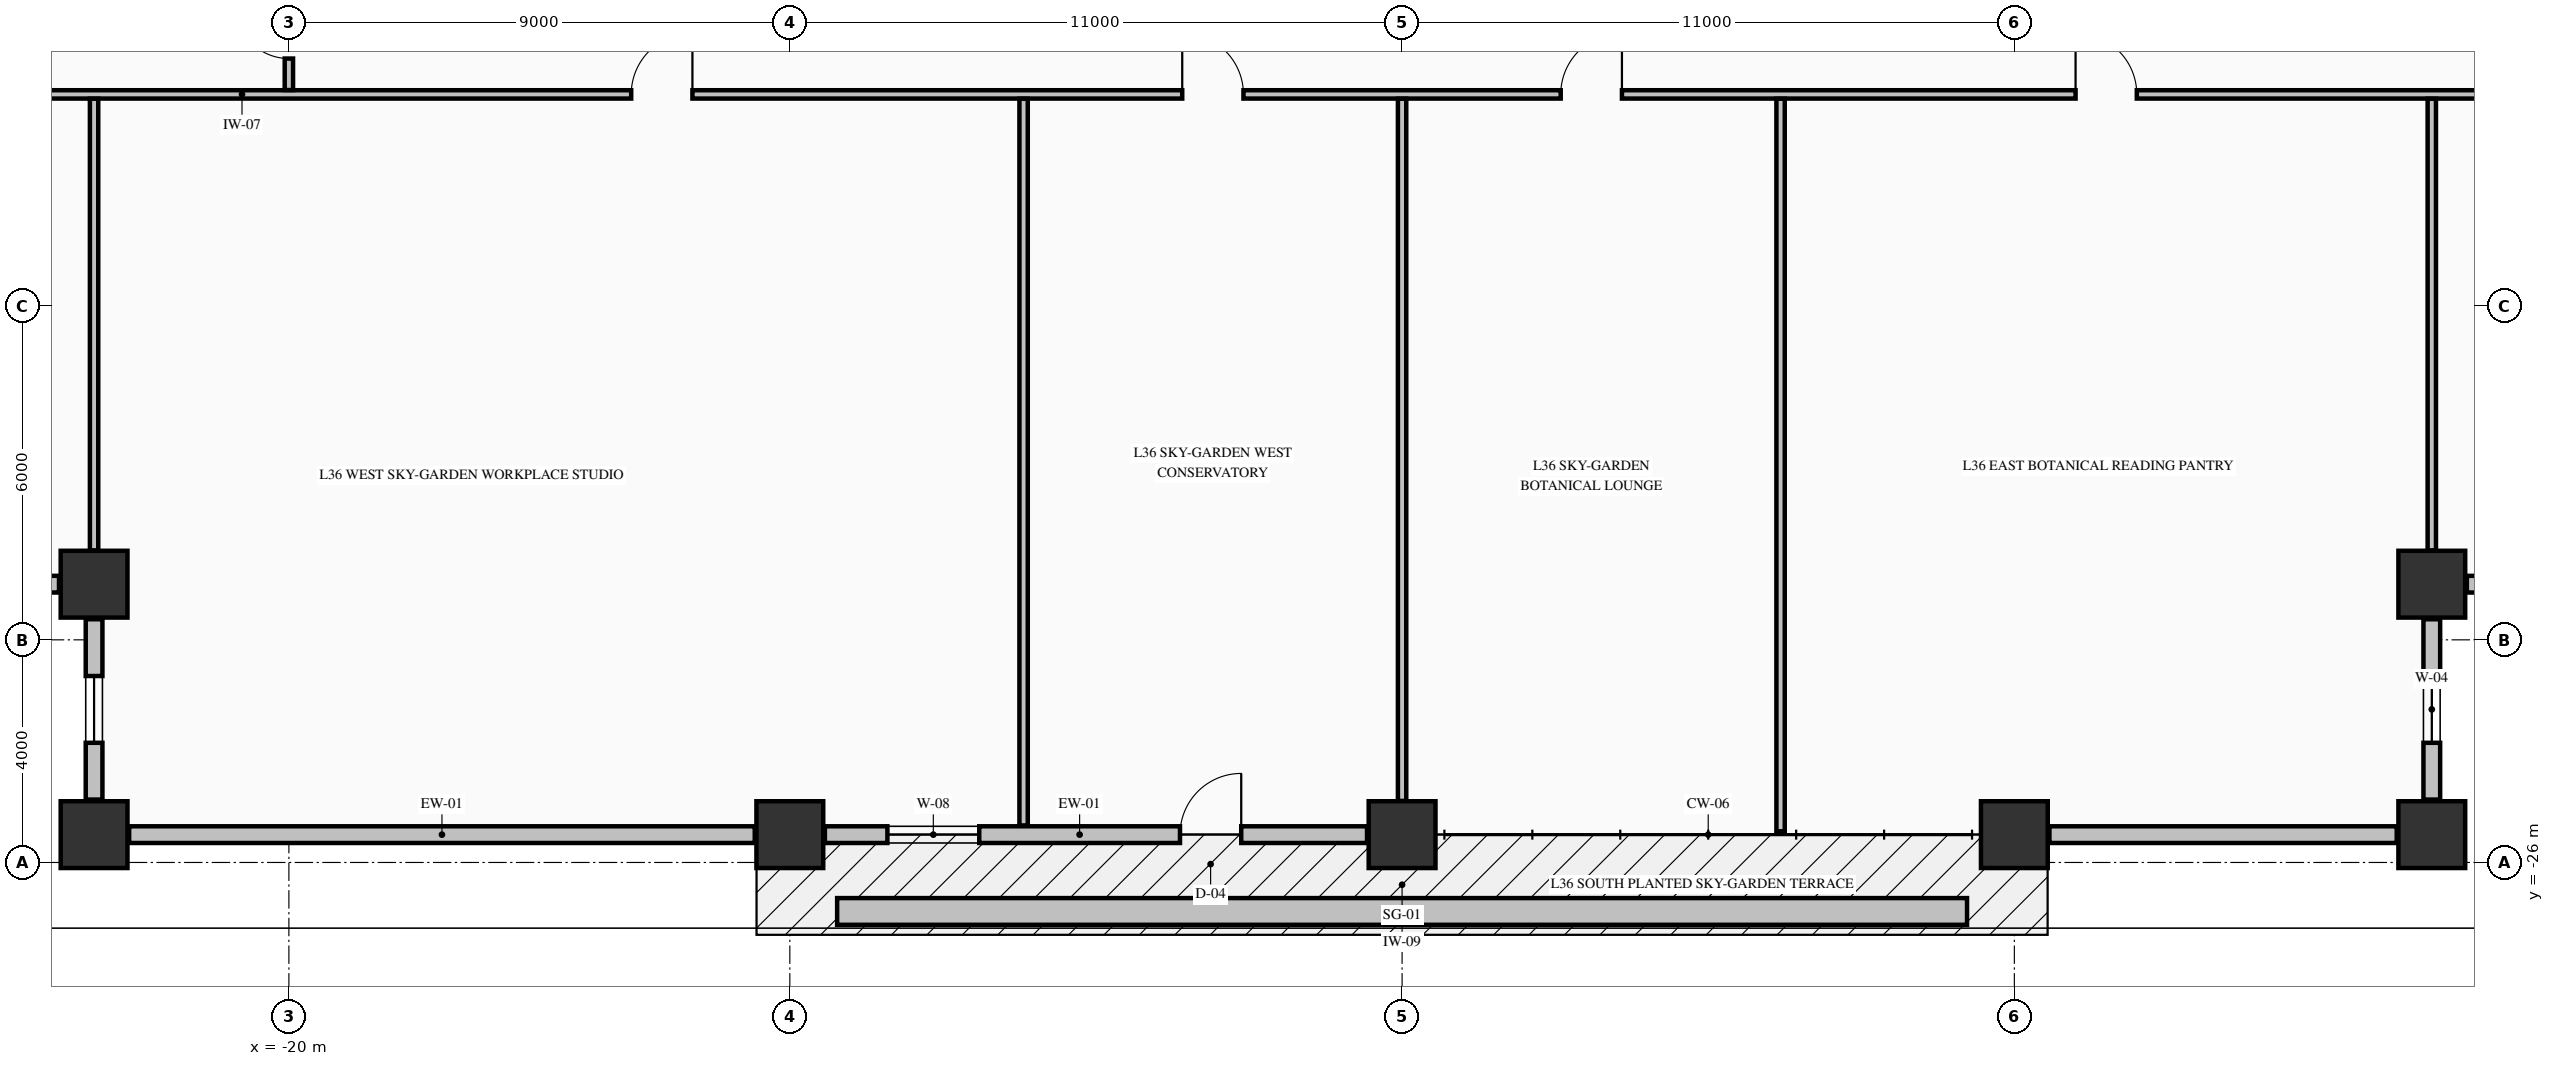
"""IFC4 building model, lengths in metres.
Left out: names, types, materials, properties, quantities, classifications, styles, units other than length and angle.
Written with IfcOpenShell. Run it as: python <this file> out.ifc"""

import sys

from ifc_helpers import new_model, si_unit, direction, frame, frame_2d, origin, origin_2d, place, context, subcontext, project, spatial, rectangle, extrude, element, fill, save


model = new_model("IFC4")
c1 = context("Model", 3, precision=1e-05, world=origin(), true_north=direction((0.0, 1.0)))
c2 = subcontext(c1, "Body", "Model", "MODEL_VIEW")
j1 = project(units=[si_unit("LENGTHUNIT", "METRE"), si_unit("PLANEANGLEUNIT", "RADIAN")], contexts=[c1])
p1 = place(None, origin())
s1 = spatial("IfcSite", under=j1, at=p1, CompositionType="ELEMENT")
p2 = place(p1, origin())
s2 = spatial("IfcBuilding", under=s1, at=p2, CompositionType="ELEMENT")
p3 = place(p2, frame((0.0, 0.0, 142.77)))
s3 = spatial("IfcBuildingStorey", under=s2, at=p3, CompositionType="ELEMENT", Elevation=142.77)
for number, where, z_axis, x_axis in (
    (1, (-23.5, -25.5, -0.325), (0.0, 0.0, 1.0), (1.0, 0.0, 0.0)),
    (2, (-11.0, -25.5, -0.325), (0.0, 0.0, 1.0), (1.0, 0.0, 0.0)),
    (3, (0.0, -25.5, -0.325), (0.0, 0.0, 1.0), (1.0, 0.0, 0.0)),
    (4, (11.0, -25.5, -0.325), (0.0, 0.0, 1.0), (1.0, 0.0, 0.0)),
    (5, (18.5, -25.5, -0.325), (0.0, 0.0, 1.0), (1.0, 0.0, 0.0)),
    (6, (-23.5, -21.0, -0.325), (0.0, 0.0, 1.0), (1.0, 0.0, 0.0)),
    (7, (18.5, -21.0, -0.325), (0.0, 0.0, 1.0), (1.0, 0.0, 0.0)),
):
    element("IfcColumn", number, at=place(p3, frame(where, z_axis=z_axis, x_axis=x_axis)), inside=s3, PredefinedType="COLUMN", context=c2, shape_type="SweptSolid", body=[
        extrude(rectangle(XDim=1.2, YDim=1.2, at=origin_2d()), origin(), (0.0, 0.0, 1.0), 3.645),
    ])
p4 = place(p3, frame((18.5, -24.87, 0.0), z_axis=(0.0, 0.0, 1.0), x_axis=(0.0, 1.0, 0.0)))
e8 = element("IfcWall", 8, at=p4, inside=s3, PredefinedType="STANDARD", context=c2, shape_type="SweptSolid", body=[
    extrude(rectangle(XDim=3.24, YDim=0.3, at=frame_2d((1.62, 0.0))), origin(), (0.0, 0.0, 1.0), 2.712),
])
p5 = place(p4, frame((1.02, 0.0, 0.82)))
e9 = element("IfcOpeningElement", 9, at=p5, cuts=e8, PredefinedType="OPENING", context=c2, shape_type="SweptSolid", body=[
    extrude(rectangle(XDim=1.2, YDim=1.65, at=frame_2d((0.6, 0.825))), frame((0.0, 0.16, 0.0), z_axis=(0.0, -1.0, 0.0), x_axis=(1.0, 0.0, 0.0)), (0.0, 0.0, 1.0), 0.32),
])
p6 = place(p3, frame((19.13, -21.0, 0.0), z_axis=(0.0, 0.0, 1.0), x_axis=(1.0, 0.0, 0.0)))
e10 = element("IfcWall", 10, at=p6, inside=s3, PredefinedType="STANDARD", context=c2, shape_type="SweptSolid", body=[
    extrude(rectangle(XDim=3.24, YDim=0.3, at=frame_2d((1.62, 0.0))), origin(), (0.0, 0.0, 1.0), 2.712),
])
p7 = place(p6, frame((1.02, 0.0, 0.82)))
e11 = element("IfcOpeningElement", 11, at=p7, cuts=e10, PredefinedType="OPENING", context=c2, shape_type="SweptSolid", body=[
    extrude(rectangle(XDim=1.2, YDim=1.65, at=frame_2d((0.6, 0.825))), frame((0.0, 0.16, 0.0), z_axis=(0.0, -1.0, 0.0), x_axis=(1.0, 0.0, 0.0)), (0.0, 0.0, 1.0), 0.32),
])
p8 = place(p3, frame((-27.37, -21.0, 0.0), z_axis=(0.0, 0.0, 1.0), x_axis=(1.0, 0.0, 0.0)))
e12 = element("IfcWall", 12, at=p8, inside=s3, PredefinedType="STANDARD", context=c2, shape_type="SweptSolid", body=[
    extrude(rectangle(XDim=3.24, YDim=0.3, at=frame_2d((1.62, 0.0))), origin(), (0.0, 0.0, 1.0), 2.712),
])
p9 = place(p8, frame((1.02, 0.0, 0.82)))
e13 = element("IfcOpeningElement", 13, at=p9, cuts=e12, PredefinedType="OPENING", context=c2, shape_type="SweptSolid", body=[
    extrude(rectangle(XDim=1.2, YDim=1.65, at=frame_2d((0.6, 0.825))), frame((0.0, 0.16, 0.0), z_axis=(0.0, -1.0, 0.0), x_axis=(1.0, 0.0, 0.0)), (0.0, 0.0, 1.0), 0.32),
])
p10 = place(p3, frame((-23.5, -21.63, 0.0), z_axis=(0.0, 0.0, 1.0), x_axis=(0.0, -1.0, 0.0)))
e14 = element("IfcWall", 14, at=p10, inside=s3, PredefinedType="STANDARD", context=c2, shape_type="SweptSolid", body=[
    extrude(rectangle(XDim=3.24, YDim=0.3, at=frame_2d((1.62, 0.0))), origin(), (0.0, 0.0, 1.0), 2.712),
])
p11 = place(p10, frame((1.02, 0.0, 0.82)))
e15 = element("IfcOpeningElement", 15, at=p11, cuts=e14, PredefinedType="OPENING", context=c2, shape_type="SweptSolid", body=[
    extrude(rectangle(XDim=1.2, YDim=1.65, at=frame_2d((0.6, 0.825))), frame((0.0, 0.16, 0.0), z_axis=(0.0, -1.0, 0.0), x_axis=(1.0, 0.0, 0.0)), (0.0, 0.0, 1.0), 0.32),
])
p12 = place(p3, frame((-22.87, -25.5, 0.0), z_axis=(0.0, 0.0, 1.0), x_axis=(1.0, 0.0, 0.0)))
e16 = element("IfcWall", 16, at=p12, inside=s3, PredefinedType="STANDARD", context=c2, shape_type="SweptSolid", body=[
    extrude(rectangle(XDim=11.24, YDim=0.3, at=frame_2d((5.62, 0.0))), origin(), (0.0, 0.0, 1.0), 2.712),
])
p13 = place(p3, frame((-10.37, -25.5, 0.0), z_axis=(0.0, 0.0, 1.0), x_axis=(1.0, 0.0, 0.0)))
e17 = element("IfcWall", 17, at=p13, inside=s3, PredefinedType="STANDARD", context=c2, shape_type="SweptSolid", body=[
    extrude(rectangle(XDim=9.74, YDim=0.3, at=frame_2d((4.87, 0.0))), origin(), (0.0, 0.0, 1.0), 2.712),
])
p14 = place(p13, frame((6.38, 0.0, 0.0)))
e18 = element("IfcOpeningElement", 18, at=p14, cuts=e17, PredefinedType="OPENING", context=c2, shape_type="SweptSolid", body=[
    extrude(rectangle(XDim=1.1, YDim=2.15, at=frame_2d((0.55, 1.075))), frame((0.0, 0.16, 0.0), z_axis=(0.0, -1.0, 0.0), x_axis=(1.0, 0.0, 0.0)), (0.0, 0.0, 1.0), 0.32),
])
p15 = place(p13, frame((1.123, 0.0, 0.8)))
e19 = element("IfcOpeningElement", 19, at=p15, cuts=e17, PredefinedType="OPENING", context=c2, shape_type="SweptSolid", body=[
    extrude(rectangle(XDim=1.65, YDim=1.7, at=frame_2d((0.825, 0.85))), frame((0.0, 0.16, 0.0), z_axis=(0.0, -1.0, 0.0), x_axis=(1.0, 0.0, 0.0)), (0.0, 0.0, 1.0), 0.32),
])
p16 = place(p3, frame((11.63, -25.5, 0.0), z_axis=(0.0, 0.0, 1.0), x_axis=(1.0, 0.0, 0.0)))
e20 = element("IfcWall", 20, at=p16, inside=s3, PredefinedType="STANDARD", context=c2, shape_type="SweptSolid", body=[
    extrude(rectangle(XDim=6.24, YDim=0.3, at=frame_2d((3.12, 0.0))), origin(), (0.0, 0.0, 1.0), 2.712),
])
p17 = place(p3, frame((-27.835, -12.2, 0.0), z_axis=(0.0, 0.0, 1.0), x_axis=(1.0, 0.0, 0.0)))
e21 = element("IfcWall", 21, at=p17, inside=s3, PredefinedType="PARTITIONING", context=c2, shape_type="SweptSolid", body=[
    extrude(rectangle(XDim=50.67, YDim=0.15, at=frame_2d((25.335, 0.0))), origin(), (0.0, 0.0, 1.0), 3.32),
])
p18 = place(p17, frame((13.985, 0.0, 0.0)))
e22 = element("IfcOpeningElement", 22, at=p18, cuts=e21, PredefinedType="OPENING", context=c2, shape_type="SweptSolid", body=[
    extrude(rectangle(XDim=1.1, YDim=2.15, at=frame_2d((0.55, 1.075))), frame((0.0, 0.085, 0.0), z_axis=(0.0, -1.0, 0.0), x_axis=(1.0, 0.0, 0.0)), (0.0, 0.0, 1.0), 0.17),
])
p19 = place(p17, frame((23.885, 0.0, 0.0)))
e23 = element("IfcOpeningElement", 23, at=p19, cuts=e21, PredefinedType="OPENING", context=c2, shape_type="SweptSolid", body=[
    extrude(rectangle(XDim=1.1, YDim=2.15, at=frame_2d((0.55, 1.075))), frame((0.0, 0.085, 0.0), z_axis=(0.0, -1.0, 0.0), x_axis=(1.0, 0.0, 0.0)), (0.0, 0.0, 1.0), 0.17),
])
p20 = place(p17, frame((30.685, 0.0, 0.0)))
e24 = element("IfcOpeningElement", 24, at=p20, cuts=e21, PredefinedType="OPENING", context=c2, shape_type="SweptSolid", body=[
    extrude(rectangle(XDim=1.1, YDim=2.15, at=frame_2d((0.55, 1.075))), frame((0.0, 0.085, 0.0), z_axis=(0.0, -1.0, 0.0), x_axis=(1.0, 0.0, 0.0)), (0.0, 0.0, 1.0), 0.17),
])
p21 = place(p17, frame((39.935, 0.0, 0.0)))
e25 = element("IfcOpeningElement", 25, at=p21, cuts=e21, PredefinedType="OPENING", context=c2, shape_type="SweptSolid", body=[
    extrude(rectangle(XDim=1.1, YDim=2.15, at=frame_2d((0.55, 1.075))), frame((0.0, 0.085, 0.0), z_axis=(0.0, -1.0, 0.0), x_axis=(1.0, 0.0, 0.0)), (0.0, 0.0, 1.0), 0.17),
])
p22 = place(p3, frame((-23.5, -20.394, 0.0), z_axis=(0.0, 0.0, 1.0), x_axis=(0.0, 1.0, 0.0)))
e26 = element("IfcWall", 26, at=p22, inside=s3, PredefinedType="PARTITIONING", context=c2, shape_type="SweptSolid", body=[
    extrude(rectangle(XDim=8.116, YDim=0.15, at=frame_2d((4.058, 0.0))), origin(), (0.0, 0.0, 1.0), 3.32),
])
p23 = place(p3, frame((-20.0, -12.122, 0.0), z_axis=(0.0, 0.0, 1.0), x_axis=(0.0, 1.0, 0.0)))
e27 = element("IfcWall", 27, at=p23, inside=s3, PredefinedType="PARTITIONING", context=c2, shape_type="SweptSolid", body=[
    extrude(rectangle(XDim=1.666, YDim=0.15, at=frame_2d((0.833, 0.0))), origin(), (0.0, 0.0, 1.0), 2.81),
])
p24 = place(p23, frame((0.566, 0.0, 0.0)))
e28 = element("IfcOpeningElement", 28, at=p24, cuts=e27, PredefinedType="OPENING", context=c2, shape_type="SweptSolid", body=[
    extrude(rectangle(XDim=0.95, YDim=2.15, at=frame_2d((0.475, 1.075))), frame((0.0, 0.085, 0.0), z_axis=(0.0, -1.0, 0.0), x_axis=(1.0, 0.0, 0.0)), (0.0, 0.0, 1.0), 0.17),
])
p25 = place(p3, frame((-6.8, -25.335, 0.0), z_axis=(0.0, 0.0, 1.0), x_axis=(0.0, 1.0, 0.0)))
e29 = element("IfcWall", 29, at=p25, inside=s3, PredefinedType="PARTITIONING", context=c2, shape_type="SweptSolid", body=[
    extrude(rectangle(XDim=13.057, YDim=0.15, at=frame_2d((6.528, 0.0))), origin(), (0.0, 0.0, 1.0), 3.32),
])
p26 = place(p3, frame((0.0, -24.894, 0.0), z_axis=(0.0, 0.0, 1.0), x_axis=(0.0, 1.0, 0.0)))
e30 = element("IfcWall", 30, at=p26, inside=s3, PredefinedType="PARTITIONING", context=c2, shape_type="SweptSolid", body=[
    extrude(rectangle(XDim=12.616, YDim=0.15, at=frame_2d((6.308, 0.0))), origin(), (0.0, 0.0, 1.0), 3.32),
])
p27 = place(p3, frame((6.8, -25.44, 0.0), z_axis=(0.0, 0.0, 1.0), x_axis=(0.0, 1.0, 0.0)))
e31 = element("IfcWall", 31, at=p27, inside=s3, PredefinedType="PARTITIONING", context=c2, shape_type="SweptSolid", body=[
    extrude(rectangle(XDim=13.162, YDim=0.15, at=frame_2d((6.581, 0.0))), origin(), (0.0, 0.0, 1.0), 3.32),
])
p28 = place(p3, frame((18.5, -20.394, 0.0), z_axis=(0.0, 0.0, 1.0), x_axis=(0.0, 1.0, 0.0)))
e32 = element("IfcWall", 32, at=p28, inside=s3, PredefinedType="PARTITIONING", context=c2, shape_type="SweptSolid", body=[
    extrude(rectangle(XDim=8.116, YDim=0.15, at=frame_2d((4.058, 0.0))), origin(), (0.0, 0.0, 1.0), 3.32),
])
p29 = place(p3, frame((-10.15, -26.88, -0.04), z_axis=(0.0, 0.0, 1.0), x_axis=(1.0, 0.0, 0.0)))
e33 = element("IfcWall", 33, at=p29, inside=s3, PredefinedType="PARAPET", context=c2, shape_type="SweptSolid", body=[
    extrude(rectangle(XDim=20.3, YDim=0.48, at=frame_2d((10.15, 0.0))), origin(), (0.0, 0.0, 1.0), 0.52),
])
p30 = place(p5, origin())
e34 = element("IfcWindow", 34, at=p30, inside=s3, PartitioningType="SINGLE_PANEL", PredefinedType="WINDOW", context=c2, shape_type="SweptSolid", body=[
    extrude(rectangle(XDim=1.2, YDim=1.65, at=frame_2d((0.6, 0.825))), frame((0.0, 0.03, 0.0), z_axis=(0.0, -1.0, 0.0), x_axis=(1.0, 0.0, 0.0)), (0.0, 0.0, 1.0), 0.06),
])
fill(e9, e34)
p31 = place(p11, origin())
e35 = element("IfcWindow", 35, at=p31, inside=s3, PartitioningType="SINGLE_PANEL", PredefinedType="WINDOW", context=c2, shape_type="SweptSolid", body=[
    extrude(rectangle(XDim=1.2, YDim=1.65, at=frame_2d((0.6, 0.825))), frame((0.0, 0.03, 0.0), z_axis=(0.0, -1.0, 0.0), x_axis=(1.0, 0.0, 0.0)), (0.0, 0.0, 1.0), 0.06),
])
fill(e15, e35)
p32 = place(p14, origin())
e36 = element("IfcDoor", 36, at=p32, inside=s3, OperationType="SINGLE_SWING_RIGHT", PredefinedType="DOOR", context=c2, shape_type="SweptSolid", body=[
    extrude(rectangle(XDim=1.1, YDim=2.15, at=frame_2d((0.55, 1.075))), frame((0.0, 0.025, 0.0), z_axis=(0.0, -1.0, 0.0), x_axis=(1.0, 0.0, 0.0)), (0.0, 0.0, 1.0), 0.05),
])
fill(e18, e36)
p33 = place(p15, origin())
e37 = element("IfcWindow", 37, at=p33, inside=s3, PartitioningType="SINGLE_PANEL", PredefinedType="WINDOW", context=c2, shape_type="SweptSolid", body=[
    extrude(rectangle(XDim=1.65, YDim=1.7, at=frame_2d((0.825, 0.85))), frame((0.0, 0.03, 0.0), z_axis=(0.0, -1.0, 0.0), x_axis=(1.0, 0.0, 0.0)), (0.0, 0.0, 1.0), 0.06),
])
fill(e19, e37)
p34 = place(p18, origin())
e38 = element("IfcDoor", 38, at=p34, inside=s3, OperationType="SINGLE_SWING_RIGHT", PredefinedType="DOOR", context=c2, shape_type="SweptSolid", body=[
    extrude(rectangle(XDim=1.1, YDim=2.15, at=frame_2d((0.55, 1.075))), frame((0.0, 0.025, 0.0), z_axis=(0.0, -1.0, 0.0), x_axis=(1.0, 0.0, 0.0)), (0.0, 0.0, 1.0), 0.05),
])
fill(e22, e38)
p35 = place(p19, origin())
e39 = element("IfcDoor", 39, at=p35, inside=s3, OperationType="SINGLE_SWING_LEFT", PredefinedType="DOOR", context=c2, shape_type="SweptSolid", body=[
    extrude(rectangle(XDim=1.1, YDim=2.15, at=frame_2d((0.55, 1.075))), frame((0.0, 0.025, 0.0), z_axis=(0.0, -1.0, 0.0), x_axis=(1.0, 0.0, 0.0)), (0.0, 0.0, 1.0), 0.05),
])
fill(e23, e39)
p36 = place(p20, origin())
e40 = element("IfcDoor", 40, at=p36, inside=s3, OperationType="SINGLE_SWING_RIGHT", PredefinedType="DOOR", context=c2, shape_type="SweptSolid", body=[
    extrude(rectangle(XDim=1.1, YDim=2.15, at=frame_2d((0.55, 1.075))), frame((0.0, 0.025, 0.0), z_axis=(0.0, -1.0, 0.0), x_axis=(1.0, 0.0, 0.0)), (0.0, 0.0, 1.0), 0.05),
])
fill(e24, e40)
p37 = place(p21, origin())
e41 = element("IfcDoor", 41, at=p37, inside=s3, OperationType="SINGLE_SWING_LEFT", PredefinedType="DOOR", context=c2, shape_type="SweptSolid", body=[
    extrude(rectangle(XDim=1.1, YDim=2.15, at=frame_2d((0.55, 1.075))), frame((0.0, 0.025, 0.0), z_axis=(0.0, -1.0, 0.0), x_axis=(1.0, 0.0, 0.0)), (0.0, 0.0, 1.0), 0.05),
])
fill(e25, e41)
p38 = place(p24, origin())
e42 = element("IfcDoor", 42, at=p38, inside=s3, OperationType="SINGLE_SWING_RIGHT", PredefinedType="DOOR", context=c2, shape_type="SweptSolid", body=[
    extrude(rectangle(XDim=0.95, YDim=2.15, at=frame_2d((0.475, 1.075))), frame((0.0, 0.025, 0.0), z_axis=(0.0, -1.0, 0.0), x_axis=(1.0, 0.0, 0.0)), (0.0, 0.0, 1.0), 0.05),
])
fill(e28, e42)
save(model, sys.argv[1])
